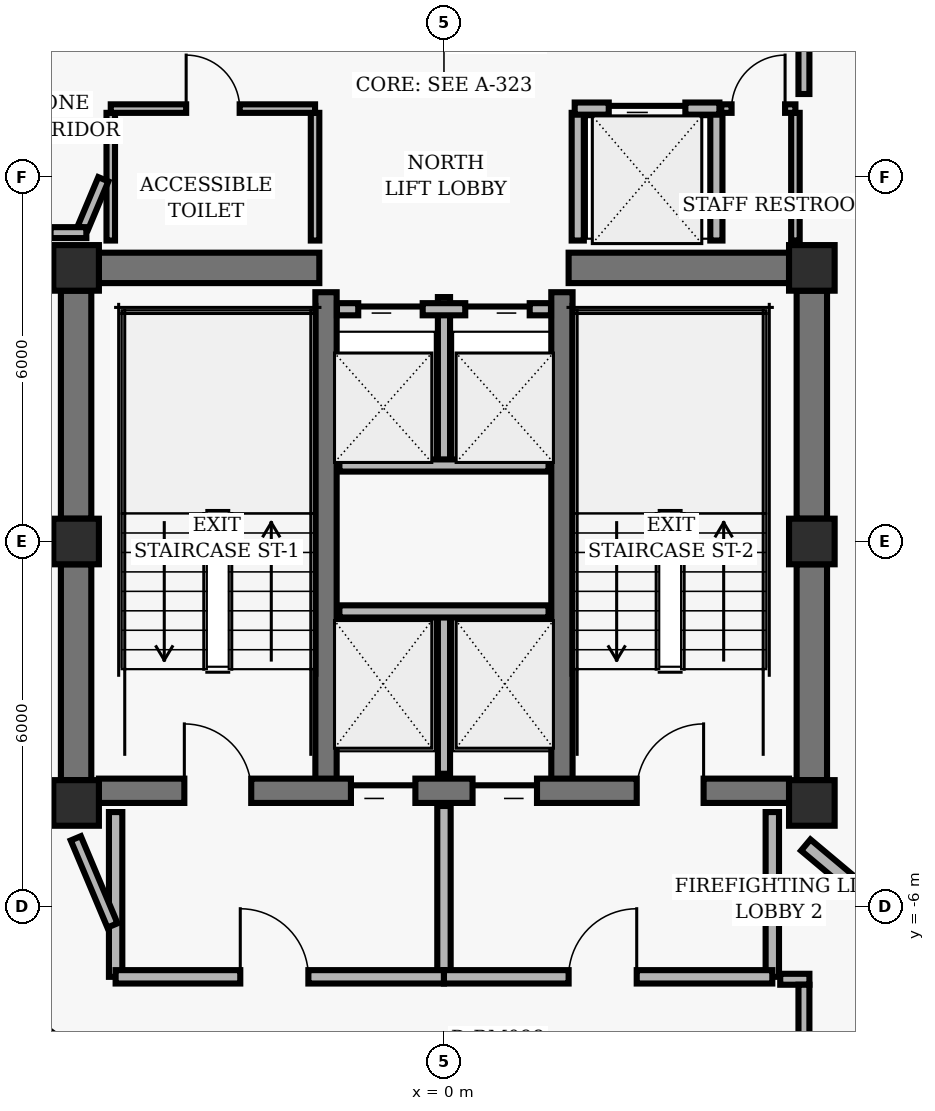
"""IFC4 building model, lengths in metres.
Left out: names, types, materials, properties, quantities, classifications, styles, units other than length and angle.
Written with IfcOpenShell. Run it as: python <this file> out.ifc"""

import sys

from ifc_helpers import new_model, si_unit, direction, frame, frame_2d, origin, origin_2d, place, context, subcontext, project, spatial, rectangle, hollow_rectangle, extrude, element, fill, save


model = new_model("IFC4")
c1 = context("Model", 3, precision=1e-05, world=origin(), true_north=direction((0.0, 1.0)))
c2 = subcontext(c1, "Body", "Model", "MODEL_VIEW")
j1 = project(units=[si_unit("LENGTHUNIT", "METRE"), si_unit("PLANEANGLEUNIT", "RADIAN")], contexts=[c1])
p1 = place(None, origin())
s1 = spatial("IfcSite", under=j1, at=p1, CompositionType="ELEMENT")
p2 = place(p1, origin())
s2 = spatial("IfcBuilding", under=s1, at=p2, CompositionType="ELEMENT")
p3 = place(p2, frame((0.0, 0.0, 233.12)))
s3 = spatial("IfcBuildingStorey", under=s2, at=p3, CompositionType="ELEMENT", Elevation=233.12)
for number, where, z_axis, x_axis in (
    (1, (-6.05, 4.5, 0.0), (0.0, 0.0, 1.0), (1.0, 0.0, 0.0)),
    (2, (6.05, 4.5, 0.0), (0.0, 0.0, 1.0), (1.0, 0.0, 0.0)),
    (3, (-6.05, 0.0, 0.0), (0.0, 0.0, 1.0), (1.0, 0.0, 0.0)),
    (4, (6.05, 0.0, 0.0), (0.0, 0.0, 1.0), (1.0, 0.0, 0.0)),
    (5, (-6.05, -4.3, 0.0), (0.0, 0.0, 1.0), (1.0, 0.0, 0.0)),
    (6, (6.05, -4.3, 0.0), (0.0, 0.0, 1.0), (1.0, 0.0, 0.0)),
):
    element("IfcColumn", number, at=place(p3, frame(where, z_axis=z_axis, x_axis=x_axis)), inside=s3, PredefinedType="COLUMN", context=c2, shape_type="SweptSolid", body=[
        extrude(hollow_rectangle(XDim=0.75, YDim=0.75, WallThickness=0.05, InnerFilletRadius=0.02, OuterFilletRadius=0.04, at=origin_2d()), origin(), (0.0, 0.0, 1.0), 3.04),
    ])
p4 = place(p3, frame((-6.05, 0.375, 0.0), z_axis=(0.0, 0.0, 1.0), x_axis=(0.0, 1.0, 0.0)))
e7 = element("IfcWall", 7, at=p4, inside=s3, PredefinedType="SHEAR", context=c2, shape_type="SweptSolid", body=[
    extrude(rectangle(XDim=3.75, YDim=0.5, at=frame_2d((1.875, 0.0))), origin(), (0.0, 0.0, 1.0), 2.798),
])
p5 = place(p3, frame((-6.05, -3.925, 0.0), z_axis=(0.0, 0.0, 1.0), x_axis=(0.0, 1.0, 0.0)))
e8 = element("IfcWall", 8, at=p5, inside=s3, PredefinedType="SHEAR", context=c2, shape_type="SweptSolid", body=[
    extrude(rectangle(XDim=3.55, YDim=0.5, at=frame_2d((1.775, 0.0))), origin(), (0.0, 0.0, 1.0), 2.798),
])
p6 = place(p3, frame((6.05, 0.375, 0.0), z_axis=(0.0, 0.0, 1.0), x_axis=(0.0, 1.0, 0.0)))
e9 = element("IfcWall", 9, at=p6, inside=s3, PredefinedType="SHEAR", context=c2, shape_type="SweptSolid", body=[
    extrude(rectangle(XDim=3.75, YDim=0.5, at=frame_2d((1.875, 0.0))), origin(), (0.0, 0.0, 1.0), 2.798),
])
p7 = place(p3, frame((6.05, -3.925, 0.0), z_axis=(0.0, 0.0, 1.0), x_axis=(0.0, 1.0, 0.0)))
e10 = element("IfcWall", 10, at=p7, inside=s3, PredefinedType="SHEAR", context=c2, shape_type="SweptSolid", body=[
    extrude(rectangle(XDim=3.55, YDim=0.5, at=frame_2d((1.775, 0.0))), origin(), (0.0, 0.0, 1.0), 2.798),
])
for number, where, z_axis, x_axis in (
    (11, (-1.94, -4.1, 0.0), (0.0, 0.0, 1.0), (0.0, 1.0, 0.0)),
    (12, (1.94, -4.1, 0.0), (0.0, 0.0, 1.0), (0.0, 1.0, 0.0)),
):
    element("IfcWall", number, at=place(p3, frame(where, z_axis=z_axis, x_axis=x_axis)), inside=s3, PredefinedType="SHEAR", context=c2, shape_type="SweptSolid", body=[
        extrude(rectangle(XDim=8.2, YDim=0.35, at=frame_2d((4.1, 0.0))), origin(), (0.0, 0.0, 1.0), 2.798),
    ])
p8 = place(p3, frame((-5.675, -4.1, 0.0), z_axis=(0.0, 0.0, 1.0), x_axis=(1.0, 0.0, 0.0)))
e13 = element("IfcWall", 13, at=p8, inside=s3, PredefinedType="SHEAR", context=c2, shape_type="SweptSolid", body=[
    extrude(rectangle(XDim=11.35, YDim=0.4, at=frame_2d((5.675, 0.0))), origin(), (0.0, 0.0, 1.0), 2.798),
])
p9 = place(p8, frame((1.405, 0.0, 0.0)))
e14 = element("IfcOpeningElement", 14, at=p9, cuts=e13, PredefinedType="OPENING", context=c2, shape_type="SweptSolid", body=[
    extrude(rectangle(XDim=1.1, YDim=2.04, at=frame_2d((0.55, 1.02))), frame((0.0, 0.21, 0.0), z_axis=(0.0, -1.0, 0.0), x_axis=(1.0, 0.0, 0.0)), (0.0, 0.0, 1.0), 0.42),
])
p10 = place(p8, frame((8.845, 0.0, 0.0)))
e15 = element("IfcOpeningElement", 15, at=p10, cuts=e13, PredefinedType="OPENING", context=c2, shape_type="SweptSolid", body=[
    extrude(rectangle(XDim=1.1, YDim=2.04, at=frame_2d((0.55, 1.02))), frame((0.0, 0.21, 0.0), z_axis=(0.0, -1.0, 0.0), x_axis=(1.0, 0.0, 0.0)), (0.0, 0.0, 1.0), 0.42),
])
p11 = place(p8, frame((4.145, 0.0, 0.0)))
e16 = element("IfcOpeningElement", 16, at=p11, cuts=e13, PredefinedType="OPENING", context=c2, shape_type="SweptSolid", body=[
    extrude(rectangle(XDim=1.06, YDim=2.04, at=frame_2d((0.53, 1.02))), frame((0.0, 0.21, 0.0), z_axis=(0.0, -1.0, 0.0), x_axis=(1.0, 0.0, 0.0)), (0.0, 0.0, 1.0), 0.42),
])
p12 = place(p8, frame((6.145, 0.0, 0.0)))
e17 = element("IfcOpeningElement", 17, at=p12, cuts=e13, PredefinedType="OPENING", context=c2, shape_type="SweptSolid", body=[
    extrude(rectangle(XDim=1.06, YDim=2.04, at=frame_2d((0.53, 1.02))), frame((0.0, 0.21, 0.0), z_axis=(0.0, -1.0, 0.0), x_axis=(1.0, 0.0, 0.0)), (0.0, 0.0, 1.0), 0.42),
])
for number, where, z_axis, x_axis in (
    (18, (-5.675, 4.5, 0.0), (0.0, 0.0, 1.0), (1.0, 0.0, 0.0)),
    (19, (2.05, 4.5, 0.0), (0.0, 0.0, 1.0), (1.0, 0.0, 0.0)),
):
    element("IfcWall", number, at=place(p3, frame(where, z_axis=z_axis, x_axis=x_axis)), inside=s3, PredefinedType="SHEAR", context=c2, shape_type="SweptSolid", body=[
        extrude(rectangle(XDim=3.625, YDim=0.5, at=frame_2d((1.812, 0.0))), origin(), (0.0, 0.0, 1.0), 2.798),
    ])
p13 = place(p3, frame((0.0, -3.82, 0.0), z_axis=(0.0, 0.0, 1.0), x_axis=(0.0, 1.0, 0.0)))
e20 = element("IfcWall", 20, at=p13, inside=s3, PredefinedType="PARTITIONING", context=c2, shape_type="SweptSolid", body=[
    extrude(rectangle(XDim=2.67, YDim=0.2, at=frame_2d((1.335, 0.0))), origin(), (0.0, 0.0, 1.0), 2.773),
])
p14 = place(p3, frame((-1.72, -1.15, 0.0), z_axis=(0.0, 0.0, 1.0), x_axis=(1.0, 0.0, 0.0)))
e21 = element("IfcWall", 21, at=p14, inside=s3, PredefinedType="PARTITIONING", context=c2, shape_type="SweptSolid", body=[
    extrude(rectangle(XDim=3.44, YDim=0.2, at=frame_2d((1.72, 0.0))), origin(), (0.0, 0.0, 1.0), 2.773),
])
for number, where, z_axis, x_axis in (
    (22, (-5.4, -7.16, 0.0), (0.0, 0.0, 1.0), (0.0, 1.0, 0.0)),
    (23, (5.4, -7.16, 0.0), (0.0, 0.0, 1.0), (0.0, 1.0, 0.0)),
):
    element("IfcWall", number, at=place(p3, frame(where, z_axis=z_axis, x_axis=x_axis)), inside=s3, PredefinedType="PARTITIONING", context=c2, shape_type="SweptSolid", body=[
        extrude(rectangle(XDim=2.71, YDim=0.22, at=frame_2d((1.355, 0.0))), origin(), (0.0, 0.0, 1.0), 2.773),
    ])
p15 = place(p3, frame((0.0, -7.16, 0.0), z_axis=(0.0, 0.0, 1.0), x_axis=(0.0, 1.0, 0.0)))
e24 = element("IfcWall", 24, at=p15, inside=s3, PredefinedType="PARTITIONING", context=c2, shape_type="SweptSolid", body=[
    extrude(rectangle(XDim=2.81, YDim=0.22, at=frame_2d((1.405, 0.0))), origin(), (0.0, 0.0, 1.0), 2.773),
])
p16 = place(p3, frame((-5.4, -7.16, 0.0), z_axis=(0.0, 0.0, 1.0), x_axis=(1.0, 0.0, 0.0)))
e25 = element("IfcWall", 25, at=p16, inside=s3, PredefinedType="PARTITIONING", context=c2, shape_type="SweptSolid", body=[
    extrude(rectangle(XDim=5.4, YDim=0.22, at=frame_2d((2.7, 0.0))), origin(), (0.0, 0.0, 1.0), 2.395),
])
p17 = place(p16, frame((2.05, 0.0, 0.0)))
e26 = element("IfcOpeningElement", 26, at=p17, cuts=e25, PredefinedType="OPENING", context=c2, shape_type="SweptSolid", body=[
    extrude(rectangle(XDim=1.12, YDim=2.02, at=frame_2d((0.56, 1.01))), frame((0.0, 0.12, 0.0), z_axis=(0.0, -1.0, 0.0), x_axis=(1.0, 0.0, 0.0)), (0.0, 0.0, 1.0), 0.24),
])
p18 = place(p3, frame((0.0, -7.16, 0.0), z_axis=(0.0, 0.0, 1.0), x_axis=(1.0, 0.0, 0.0)))
e27 = element("IfcWall", 27, at=p18, inside=s3, PredefinedType="PARTITIONING", context=c2, shape_type="SweptSolid", body=[
    extrude(rectangle(XDim=5.4, YDim=0.22, at=frame_2d((2.7, 0.0))), origin(), (0.0, 0.0, 1.0), 2.773),
])
p19 = place(p18, frame((2.05, 0.0, 0.0)))
e28 = element("IfcOpeningElement", 28, at=p19, cuts=e27, PredefinedType="OPENING", context=c2, shape_type="SweptSolid", body=[
    extrude(rectangle(XDim=1.12, YDim=2.02, at=frame_2d((0.56, 1.01))), frame((0.0, 0.12, 0.0), z_axis=(0.0, -1.0, 0.0), x_axis=(1.0, 0.0, 0.0)), (0.0, 0.0, 1.0), 0.24),
])
p20 = place(p3, frame((0.0, 1.25, 0.0), z_axis=(0.0, 0.0, 1.0), x_axis=(0.0, 1.0, 0.0)))
e29 = element("IfcWall", 29, at=p20, inside=s3, PredefinedType="PARTITIONING", context=c2, shape_type="SweptSolid", body=[
    extrude(rectangle(XDim=2.77, YDim=0.2, at=frame_2d((1.385, 0.0))), origin(), (0.0, 0.0, 1.0), 2.773),
])
p21 = place(p3, frame((-1.72, 1.25, 0.0), z_axis=(0.0, 0.0, 1.0), x_axis=(1.0, 0.0, 0.0)))
e30 = element("IfcWall", 30, at=p21, inside=s3, PredefinedType="PARTITIONING", context=c2, shape_type="SweptSolid", body=[
    extrude(rectangle(XDim=3.44, YDim=0.2, at=frame_2d((1.72, 0.0))), origin(), (0.0, 0.0, 1.0), 2.773),
])
p22 = place(p3, frame((-1.76, 3.82, 0.0), z_axis=(0.0, 0.0, 1.0), x_axis=(1.0, 0.0, 0.0)))
e31 = element("IfcWall", 31, at=p22, inside=s3, PredefinedType="PARTITIONING", context=c2, shape_type="SweptSolid", body=[
    extrude(rectangle(XDim=3.52, YDim=0.2, at=frame_2d((1.76, 0.0))), origin(), (0.0, 0.0, 1.0), 2.773),
])
p23 = place(p22, frame((0.35, 0.0, 0.0)))
e32 = element("IfcOpeningElement", 32, at=p23, cuts=e31, PredefinedType="OPENING", context=c2, shape_type="SweptSolid", body=[
    extrude(rectangle(XDim=1.06, YDim=2.04, at=frame_2d((0.53, 1.02))), frame((0.0, 0.11, 0.0), z_axis=(0.0, -1.0, 0.0), x_axis=(1.0, 0.0, 0.0)), (0.0, 0.0, 1.0), 0.22),
])
p24 = place(p22, frame((2.11, 0.0, 0.0)))
e33 = element("IfcOpeningElement", 33, at=p24, cuts=e31, PredefinedType="OPENING", context=c2, shape_type="SweptSolid", body=[
    extrude(rectangle(XDim=1.06, YDim=2.04, at=frame_2d((0.53, 1.02))), frame((0.0, 0.11, 0.0), z_axis=(0.0, -1.0, 0.0), x_axis=(1.0, 0.0, 0.0)), (0.0, 0.0, 1.0), 0.22),
])
for number, where, z_axis, x_axis in (
    (34, (2.2, 4.95, 0.0), (0.0, 0.0, 1.0), (0.0, 1.0, 0.0)),
    (35, (4.48, 4.95, 0.0), (0.0, 0.0, 1.0), (0.0, 1.0, 0.0)),
):
    element("IfcWall", number, at=place(p3, frame(where, z_axis=z_axis, x_axis=x_axis)), inside=s3, PredefinedType="PARTITIONING", context=c2, shape_type="SweptSolid", body=[
        extrude(rectangle(XDim=2.1, YDim=0.2, at=frame_2d((1.05, 0.0))), origin(), (0.0, 0.0, 1.0), 2.773),
    ])
p25 = place(p3, frame((2.15, 7.12, 0.0), z_axis=(0.0, 0.0, 1.0), x_axis=(1.0, 0.0, 0.0)))
e36 = element("IfcWall", 36, at=p25, inside=s3, PredefinedType="PARTITIONING", context=c2, shape_type="SweptSolid", body=[
    extrude(rectangle(XDim=2.38, YDim=0.2, at=frame_2d((1.19, 0.0))), origin(), (0.0, 0.0, 1.0), 2.395),
])
p26 = place(p25, frame((0.56, 0.0, 0.0)))
e37 = element("IfcOpeningElement", 37, at=p26, cuts=e36, PredefinedType="OPENING", context=c2, shape_type="SweptSolid", body=[
    extrude(rectangle(XDim=1.26, YDim=2.06, at=frame_2d((0.63, 1.03))), frame((0.0, 0.11, 0.0), z_axis=(0.0, -1.0, 0.0), x_axis=(1.0, 0.0, 0.0)), (0.0, 0.0, 1.0), 0.22),
])
for number, where, z_axis, x_axis in (
    (38, (-5.48, 4.95, 0.0), (0.0, 0.0, 1.0), (0.0, 1.0, 0.0)),
    (39, (-2.12, 4.95, 0.0), (0.0, 0.0, 1.0), (0.0, 1.0, 0.0)),
):
    element("IfcWall", number, at=place(p3, frame(where, z_axis=z_axis, x_axis=x_axis)), inside=s3, PredefinedType="PARTITIONING", context=c2, shape_type="SweptSolid", body=[
        extrude(rectangle(XDim=2.1, YDim=0.14, at=frame_2d((1.05, 0.0))), origin(), (0.0, 0.0, 1.0), 2.773),
    ])
p27 = place(p3, frame((-5.48, 7.12, 0.0), z_axis=(0.0, 0.0, 1.0), x_axis=(1.0, 0.0, 0.0)))
e40 = element("IfcWall", 40, at=p27, inside=s3, PredefinedType="PARTITIONING", context=c2, shape_type="SweptSolid", body=[
    extrude(rectangle(XDim=3.36, YDim=0.14, at=frame_2d((1.68, 0.0))), origin(), (0.0, 0.0, 1.0), 2.395),
])
p28 = place(p27, frame((1.24, 0.0, 0.0)))
e41 = element("IfcOpeningElement", 41, at=p28, cuts=e40, PredefinedType="OPENING", context=c2, shape_type="SweptSolid", body=[
    extrude(rectangle(XDim=0.88, YDim=2.02, at=frame_2d((0.44, 1.01))), frame((0.0, 0.08, 0.0), z_axis=(0.0, -1.0, 0.0), x_axis=(1.0, 0.0, 0.0)), (0.0, 0.0, 1.0), 0.16),
])
p29 = place(p3, frame((5.78, 4.95, 0.0), z_axis=(0.0, 0.0, 1.0), x_axis=(0.0, 1.0, 0.0)))
e42 = element("IfcWall", 42, at=p29, inside=s3, PredefinedType="PARTITIONING", context=c2, shape_type="SweptSolid", body=[
    extrude(rectangle(XDim=2.1, YDim=0.14, at=frame_2d((1.05, 0.0))), origin(), (0.0, 0.0, 1.0), 2.773),
])
p30 = place(p3, frame((4.56, 7.12, 0.0), z_axis=(0.0, 0.0, 1.0), x_axis=(1.0, 0.0, 0.0)))
e43 = element("IfcWall", 43, at=p30, inside=s3, PredefinedType="PARTITIONING", context=c2, shape_type="SweptSolid", body=[
    extrude(rectangle(XDim=1.22, YDim=0.14, at=frame_2d((0.61, 0.0))), origin(), (0.0, 0.0, 1.0), 2.773),
])
p31 = place(p30, frame((0.17, 0.0, 0.0)))
e44 = element("IfcOpeningElement", 44, at=p31, cuts=e43, PredefinedType="OPENING", context=c2, shape_type="SweptSolid", body=[
    extrude(rectangle(XDim=0.88, YDim=2.02, at=frame_2d((0.44, 1.01))), frame((0.0, 0.08, 0.0), z_axis=(0.0, -1.0, 0.0), x_axis=(1.0, 0.0, 0.0)), (0.0, 0.0, 1.0), 0.16),
])
p32 = place(p3, frame((5.92, 9.16, 0.0), z_axis=(0.0, 0.0, 1.0), x_axis=(0.0, -1.0, 0.0)))
e45 = element("IfcWall", 45, at=p32, inside=s3, PredefinedType="PARTITIONING", context=c2, shape_type="SweptSolid", body=[
    extrude(rectangle(XDim=1.8, YDim=0.18, at=frame_2d((0.9, 0.0))), origin(), (0.0, 0.0, 1.0), 2.773),
])
p33 = place(p3, frame((-5.602, 5.958, 0.0), z_axis=(0.0, 0.0, 1.0), x_axis=(-0.387588639363, -0.921832439566, 0.0)))
e46 = element("IfcWall", 46, at=p33, inside=s3, PredefinedType="PARTITIONING", context=c2, shape_type="SweptSolid", body=[
    extrude(rectangle(XDim=0.862, YDim=0.18, at=frame_2d((0.431, 0.0))), origin(), (0.0, 0.0, 1.0), 2.773),
])
p34 = place(p3, frame((-5.881, 5.08, 0.0), z_axis=(0.0, 0.0, 1.0), x_axis=(-1.0, 0.0, 0.0)))
e47 = element("IfcWall", 47, at=p34, inside=s3, PredefinedType="PARTITIONING", context=c2, shape_type="SweptSolid", body=[
    extrude(rectangle(XDim=0.589, YDim=0.18, at=frame_2d((0.294, 0.0))), origin(), (0.0, 0.0, 1.0), 2.773),
])
p35 = place(p3, frame((-6.055, -4.882, 0.0), z_axis=(0.0, 0.0, 1.0), x_axis=(0.387579540458, -0.921836265189, 0.0)))
e48 = element("IfcWall", 48, at=p35, inside=s3, PredefinedType="PARTITIONING", context=c2, shape_type="SweptSolid", body=[
    extrude(rectangle(XDim=1.555, YDim=0.18, at=frame_2d((0.777, 0.0))), origin(), (0.0, 0.0, 1.0), 2.253),
])
p36 = place(p3, frame((5.53, -7.2, 0.0), z_axis=(0.0, 0.0, 1.0), x_axis=(1.0, 0.0, 0.0)))
e49 = element("IfcWall", 49, at=p36, inside=s3, PredefinedType="PARTITIONING", context=c2, shape_type="SweptSolid", body=[
    extrude(rectangle(XDim=0.48, YDim=0.18, at=frame_2d((0.24, 0.0))), origin(), (0.0, 0.0, 1.0), 2.773),
])
p37 = place(p3, frame((5.92, -7.29, 0.0), z_axis=(0.0, 0.0, 1.0), x_axis=(0.0, -1.0, 0.0)))
e50 = element("IfcWall", 50, at=p37, inside=s3, PredefinedType="PARTITIONING", context=c2, shape_type="SweptSolid", body=[
    extrude(rectangle(XDim=1.82, YDim=0.18, at=frame_2d((0.91, 0.0))), origin(), (0.0, 0.0, 1.0), 2.253),
])
p38 = place(p3, frame((5.95, -4.993, 0.0), z_axis=(0.0, 0.0, 1.0), x_axis=(0.766055051894, -0.642774966428, 0.0)))
e51 = element("IfcWall", 51, at=p38, inside=s3, PredefinedType="PARTITIONING", context=c2, shape_type="SweptSolid", body=[
    extrude(rectangle(XDim=6.137, YDim=0.24, at=frame_2d((3.069, 0.0))), origin(), (0.0, 0.0, 1.0), 2.773),
])
p39 = place(p9, origin())
e52 = element("IfcDoor", 52, at=p39, inside=s3, OperationType="SINGLE_SWING_LEFT", PredefinedType="DOOR", context=c2, shape_type="SweptSolid", body=[
    extrude(rectangle(XDim=1.1, YDim=2.04, at=frame_2d((0.55, 1.02))), frame((0.0, 0.025, 0.0), z_axis=(0.0, -1.0, 0.0), x_axis=(1.0, 0.0, 0.0)), (0.0, 0.0, 1.0), 0.05),
])
fill(e14, e52)
p40 = place(p10, origin())
e53 = element("IfcDoor", 53, at=p40, inside=s3, OperationType="SINGLE_SWING_RIGHT", PredefinedType="DOOR", context=c2, shape_type="SweptSolid", body=[
    extrude(rectangle(XDim=1.1, YDim=2.04, at=frame_2d((0.55, 1.02))), frame((0.0, 0.025, 0.0), z_axis=(0.0, -1.0, 0.0), x_axis=(1.0, 0.0, 0.0)), (0.0, 0.0, 1.0), 0.05),
])
fill(e15, e53)
p41 = place(p11, origin())
e54 = element("IfcDoor", 54, at=p41, inside=s3, OperationType="SLIDING_TO_LEFT", PredefinedType="DOOR", context=c2, shape_type="SweptSolid", body=[
    extrude(rectangle(XDim=1.06, YDim=2.04, at=frame_2d((0.53, 1.02))), frame((0.0, 0.025, 0.0), z_axis=(0.0, -1.0, 0.0), x_axis=(1.0, 0.0, 0.0)), (0.0, 0.0, 1.0), 0.05),
])
fill(e16, e54)
p42 = place(p12, origin())
e55 = element("IfcDoor", 55, at=p42, inside=s3, OperationType="SLIDING_TO_RIGHT", PredefinedType="DOOR", context=c2, shape_type="SweptSolid", body=[
    extrude(rectangle(XDim=1.06, YDim=2.04, at=frame_2d((0.53, 1.02))), frame((0.0, 0.025, 0.0), z_axis=(0.0, -1.0, 0.0), x_axis=(1.0, 0.0, 0.0)), (0.0, 0.0, 1.0), 0.05),
])
fill(e17, e55)
p43 = place(p17, origin())
e56 = element("IfcDoor", 56, at=p43, inside=s3, OperationType="SINGLE_SWING_LEFT", PredefinedType="DOOR", context=c2, shape_type="SweptSolid", body=[
    extrude(rectangle(XDim=1.12, YDim=2.02, at=frame_2d((0.56, 1.01))), frame((0.0, 0.025, 0.0), z_axis=(0.0, -1.0, 0.0), x_axis=(1.0, 0.0, 0.0)), (0.0, 0.0, 1.0), 0.05),
])
fill(e26, e56)
p44 = place(p19, origin())
e57 = element("IfcDoor", 57, at=p44, inside=s3, OperationType="SINGLE_SWING_RIGHT", PredefinedType="DOOR", context=c2, shape_type="SweptSolid", body=[
    extrude(rectangle(XDim=1.12, YDim=2.02, at=frame_2d((0.56, 1.01))), frame((0.0, 0.025, 0.0), z_axis=(0.0, -1.0, 0.0), x_axis=(1.0, 0.0, 0.0)), (0.0, 0.0, 1.0), 0.05),
])
fill(e28, e57)
p45 = place(p23, origin())
e58 = element("IfcDoor", 58, at=p45, inside=s3, OperationType="SLIDING_TO_LEFT", PredefinedType="DOOR", context=c2, shape_type="SweptSolid", body=[
    extrude(rectangle(XDim=1.06, YDim=2.04, at=frame_2d((0.53, 1.02))), frame((0.0, 0.025, 0.0), z_axis=(0.0, -1.0, 0.0), x_axis=(1.0, 0.0, 0.0)), (0.0, 0.0, 1.0), 0.05),
])
fill(e32, e58)
p46 = place(p24, origin())
e59 = element("IfcDoor", 59, at=p46, inside=s3, OperationType="SLIDING_TO_RIGHT", PredefinedType="DOOR", context=c2, shape_type="SweptSolid", body=[
    extrude(rectangle(XDim=1.06, YDim=2.04, at=frame_2d((0.53, 1.02))), frame((0.0, 0.025, 0.0), z_axis=(0.0, -1.0, 0.0), x_axis=(1.0, 0.0, 0.0)), (0.0, 0.0, 1.0), 0.05),
])
fill(e33, e59)
p47 = place(p26, origin())
e60 = element("IfcDoor", 60, at=p47, inside=s3, OperationType="SLIDING_TO_LEFT", PredefinedType="DOOR", context=c2, shape_type="SweptSolid", body=[
    extrude(rectangle(XDim=1.26, YDim=2.06, at=frame_2d((0.63, 1.03))), frame((0.0, 0.025, 0.0), z_axis=(0.0, -1.0, 0.0), x_axis=(1.0, 0.0, 0.0)), (0.0, 0.0, 1.0), 0.05),
])
fill(e37, e60)
p48 = place(p28, origin())
e61 = element("IfcDoor", 61, at=p48, inside=s3, OperationType="SINGLE_SWING_LEFT", PredefinedType="DOOR", context=c2, shape_type="SweptSolid", body=[
    extrude(rectangle(XDim=0.88, YDim=2.02, at=frame_2d((0.44, 1.01))), frame((0.0, 0.025, 0.0), z_axis=(0.0, -1.0, 0.0), x_axis=(1.0, 0.0, 0.0)), (0.0, 0.0, 1.0), 0.05),
])
fill(e41, e61)
p49 = place(p31, origin())
e62 = element("IfcDoor", 62, at=p49, inside=s3, OperationType="SINGLE_SWING_RIGHT", PredefinedType="DOOR", context=c2, shape_type="SweptSolid", body=[
    extrude(rectangle(XDim=0.88, YDim=2.02, at=frame_2d((0.44, 1.01))), frame((0.0, 0.025, 0.0), z_axis=(0.0, -1.0, 0.0), x_axis=(1.0, 0.0, 0.0)), (0.0, 0.0, 1.0), 0.05),
])
fill(e44, e62)
save(model, sys.argv[1])
